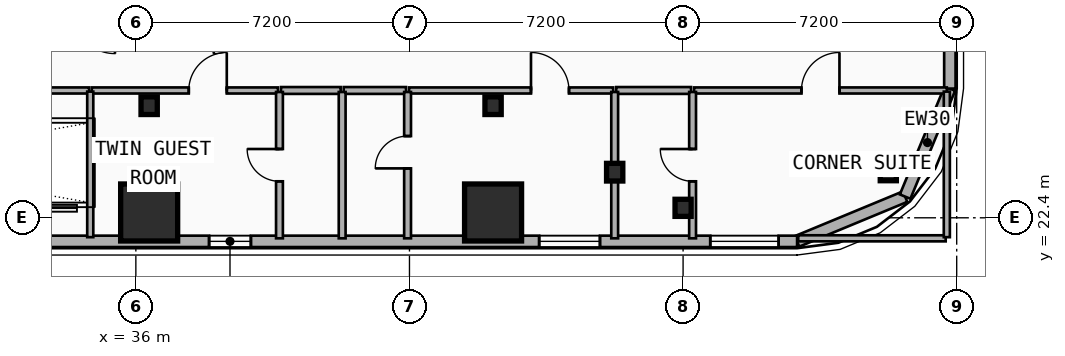
"""IFC4 building model, lengths in metres.
Left out: names, types, materials, properties, quantities, classifications, styles, units other than length and angle.
Written with IfcOpenShell. Run it as: python <this file> out.ifc"""

import sys

from ifc_helpers import new_model, si_unit, direction, frame, frame_2d, origin, origin_2d, place, context, subcontext, project, spatial, rectangle, i_section, extrude, element, fill, save


model = new_model("IFC4")
c1 = context("Model", 3, precision=1e-05, world=origin(), true_north=direction((0.0, 1.0)))
c2 = subcontext(c1, "Body", "Model", "MODEL_VIEW")
j1 = project(units=[si_unit("LENGTHUNIT", "METRE"), si_unit("PLANEANGLEUNIT", "RADIAN")], contexts=[c1])
p1 = place(None, origin())
s1 = spatial("IfcSite", under=j1, at=p1, CompositionType="ELEMENT")
p2 = place(p1, origin())
s2 = spatial("IfcBuilding", under=s1, at=p2, CompositionType="ELEMENT")
p3 = place(p2, frame((0.0, 0.0, 39.5)))
s3 = spatial("IfcBuildingStorey", under=s2, at=p3, CompositionType="ELEMENT", Elevation=39.5)
for number, where, z_axis, x_axis in (
    (1, (36.35, 25.35, 0.0), (0.0, 0.0, 1.0), (1.0, 0.0, 0.0)),
    (2, (45.4, 25.35, 0.0), (0.0, 0.0, 1.0), (1.0, 0.0, 0.0)),
):
    element("IfcColumn", number, at=place(p3, frame(where, z_axis=z_axis, x_axis=x_axis)), inside=s3, PredefinedType="COLUMN", context=c2, shape_type="SweptSolid", body=[
        extrude(i_section(OverallWidth=0.428, OverallDepth=0.465, WebThickness=0.045, FlangeThickness=0.073, FilletRadius=0.015, at=origin_2d()), origin(), (0.0, 0.0, 1.0), 3.5),
    ])
for number, where, z_axis, x_axis in (
    (3, (36.35, 22.648, 0.0), (0.0, -0.09, 0.996), (1.0, 0.0, 0.0)),
    (4, (45.4, 22.648, 0.0), (0.0, -0.09, 0.996), (1.0, 0.0, 0.0)),
):
    element("IfcColumn", number, at=place(p3, frame(where, z_axis=z_axis, x_axis=x_axis)), inside=s3, PredefinedType="COLUMN", context=c2, shape_type="SweptSolid", body=[
        extrude(rectangle(XDim=1.5, YDim=1.5, at=origin_2d()), origin(), (0.0, 0.0, 1.0), 3.514),
    ])
p4 = place(p3, frame((48.6, 23.6, 0.0), z_axis=(0.0, 0.0, 1.0), x_axis=(1.0, 0.0, 0.0)))
e5 = element("IfcColumn", 5, at=p4, inside=s3, PredefinedType="COLUMN", context=c2, shape_type="SweptSolid", body=[
    extrude(i_section(OverallWidth=0.428, OverallDepth=0.465, WebThickness=0.045, FlangeThickness=0.073, FilletRadius=0.015, at=origin_2d()), origin(), (0.0, 0.0, 1.0), 3.5),
])
p5 = place(p3, frame((50.4, 22.758, 0.0), z_axis=(0.0, -0.079891690793, 0.996803550226), x_axis=(1.0, 0.0, 0.0)))
e6 = element("IfcColumn", 6, at=p5, inside=s3, PredefinedType="COLUMN", context=c2, shape_type="SweptSolid", body=[
    extrude(i_section(OverallWidth=0.424, OverallDepth=0.45, WebThickness=0.041, FlangeThickness=0.065, FilletRadius=0.015, at=origin_2d()), origin(), (0.0, 0.0, 1.0), 3.511),
])
p6 = place(p3, frame((55.8, 23.6, 0.0), z_axis=(0.0, 0.0, 1.0), x_axis=(1.0, 0.0, 0.0)))
e7 = element("IfcColumn", 7, at=p6, inside=s3, PredefinedType="COLUMN", context=c2, shape_type="SweptSolid", body=[
    extrude(i_section(OverallWidth=0.424, OverallDepth=0.45, WebThickness=0.041, FlangeThickness=0.065, FilletRadius=0.015, at=origin_2d()), origin(), (0.0, 0.0, 1.0), 3.5),
])
p7 = place(p3, frame((56.243, 22.958, 0.0), z_axis=(0.0, 0.0, 1.0), x_axis=(-0.923882414032, -0.382676475685, 0.0)))
e8 = element("IfcWall", 8, at=p7, inside=s3, PredefinedType="SOLIDWALL", context=c2, shape_type="SweptSolid", body=[
    extrude(rectangle(XDim=3.077, YDim=0.3, at=frame_2d((1.539, 0.0))), origin(), (0.0, 0.0, 1.0), 3.24),
])
p8 = place(p3, frame((57.42, 25.8, 0.0), z_axis=(0.0, 0.0, 1.0), x_axis=(-0.382636798336, -0.92389884758, 0.0)))
e9 = element("IfcWall", 9, at=p8, inside=s3, PredefinedType="SOLIDWALL", context=c2, shape_type="SweptSolid", body=[
    extrude(rectangle(XDim=3.077, YDim=0.3, at=frame_2d((1.538, 0.0))), origin(), (0.0, 0.0, 1.0), 3.24),
])
p9 = place(p3, frame((57.42, 41.0, 0.0), z_axis=(0.0, 0.0, 1.0), x_axis=(0.0, -1.0, 0.0)))
e10 = element("IfcWall", 10, at=p9, inside=s3, PredefinedType="SOLIDWALL", context=c2, shape_type="SweptSolid", body=[
    extrude(rectangle(XDim=15.2, YDim=0.3, at=frame_2d((7.6, 0.0))), origin(), (0.0, 0.0, 1.0), 3.24),
])
p10 = place(p9, frame((10.882, 0.0, 0.48)))
e11 = element("IfcOpeningElement", 11, at=p10, cuts=e10, PredefinedType="OPENING", context=c2, shape_type="SweptSolid", body=[
    extrude(rectangle(XDim=1.4, YDim=1.8, at=frame_2d((0.7, 0.9))), frame((0.0, 0.16, 0.0), z_axis=(0.0, -1.0, 0.0), x_axis=(1.0, 0.0, 0.0)), (0.0, 0.0, 1.0), 0.32),
])
p11 = place(p9, frame((5.621, 0.0, 0.48)))
e12 = element("IfcOpeningElement", 12, at=p11, cuts=e10, PredefinedType="OPENING", context=c2, shape_type="SweptSolid", body=[
    extrude(rectangle(XDim=1.4, YDim=1.8, at=frame_2d((0.7, 0.9))), frame((0.0, 0.16, 0.0), z_axis=(0.0, -1.0, 0.0), x_axis=(1.0, 0.0, 0.0)), (0.0, 0.0, 1.0), 0.32),
])
p12 = place(p3, frame((53.4, 21.78, 0.0), z_axis=(0.0, 0.0, 1.0), x_axis=(-1.0, 0.0, 0.0)))
e13 = element("IfcWall", 13, at=p12, inside=s3, PredefinedType="SOLIDWALL", context=c2, shape_type="SweptSolid", body=[
    extrude(rectangle(XDim=49.2, YDim=0.3, at=frame_2d((24.6, 0.0))), origin(), (0.0, 0.0, 1.0), 3.24),
])
p13 = place(p12, frame((46.915, 0.0, 0.65)))
e14 = element("IfcOpeningElement", 14, at=p13, cuts=e13, PredefinedType="OPENING", context=c2, shape_type="SweptSolid", body=[
    extrude(rectangle(XDim=1.8, YDim=1.8, at=frame_2d((0.9, 0.9))), frame((0.0, 0.16, 0.0), z_axis=(0.0, -1.0, 0.0), x_axis=(1.0, 0.0, 0.0)), (0.0, 0.0, 1.0), 0.32),
])
p14 = place(p12, frame((42.413, 0.0, 0.48)))
e15 = element("IfcOpeningElement", 15, at=p14, cuts=e13, PredefinedType="OPENING", context=c2, shape_type="SweptSolid", body=[
    extrude(rectangle(XDim=1.6, YDim=1.95, at=frame_2d((0.8, 0.975))), frame((0.0, 0.16, 0.0), z_axis=(0.0, -1.0, 0.0), x_axis=(1.0, 0.0, 0.0)), (0.0, 0.0, 1.0), 0.32),
])
p15 = place(p12, frame((33.226, 0.0, 0.48)))
e16 = element("IfcOpeningElement", 16, at=p15, cuts=e13, PredefinedType="OPENING", context=c2, shape_type="SweptSolid", body=[
    extrude(rectangle(XDim=1.2, YDim=1.5, at=frame_2d((0.6, 0.75))), frame((0.0, 0.16, 0.0), z_axis=(0.0, -1.0, 0.0), x_axis=(1.0, 0.0, 0.0)), (0.0, 0.0, 1.0), 0.32),
])
p16 = place(p12, frame((14.373, 0.0, 1.48)))
e17 = element("IfcOpeningElement", 17, at=p16, cuts=e13, PredefinedType="OPENING", context=c2, shape_type="SweptSolid", body=[
    extrude(rectangle(XDim=1.1, YDim=1.05, at=frame_2d((0.55, 0.525))), frame((0.0, 0.16, 0.0), z_axis=(0.0, -1.0, 0.0), x_axis=(1.0, 0.0, 0.0)), (0.0, 0.0, 1.0), 0.32),
])
p17 = place(p12, frame((5.187, 0.0, 0.48)))
e18 = element("IfcOpeningElement", 18, at=p17, cuts=e13, PredefinedType="OPENING", context=c2, shape_type="SweptSolid", body=[
    extrude(rectangle(XDim=1.6, YDim=1.95, at=frame_2d((0.8, 0.975))), frame((0.0, 0.16, 0.0), z_axis=(0.0, -1.0, 0.0), x_axis=(1.0, 0.0, 0.0)), (0.0, 0.0, 1.0), 0.32),
])
p18 = place(p12, frame((0.485, 0.0, 0.65)))
e19 = element("IfcOpeningElement", 19, at=p18, cuts=e13, PredefinedType="OPENING", context=c2, shape_type="SweptSolid", body=[
    extrude(rectangle(XDim=1.8, YDim=1.8, at=frame_2d((0.9, 0.9))), frame((0.0, 0.16, 0.0), z_axis=(0.0, -1.0, 0.0), x_axis=(1.0, 0.0, 0.0)), (0.0, 0.0, 1.0), 0.32),
])
p19 = place(p3, frame((34.84, 25.75, 0.0), z_axis=(0.0, 0.0, 1.0), x_axis=(1.0, 0.0, 0.0)))
e20 = element("IfcWall", 20, at=p19, inside=s3, PredefinedType="PARTITIONING", context=c2, shape_type="SweptSolid", body=[
    extrude(rectangle(XDim=4.899, YDim=0.16, at=frame_2d((2.449, 0.0))), origin(), (0.0, 0.0, 1.0), 2.28),
])
p20 = place(p19, frame((2.553, 0.0, 0.0)))
e21 = element("IfcOpeningElement", 21, at=p20, cuts=e20, PredefinedType="OPENING", context=c2, shape_type="SweptSolid", body=[
    extrude(rectangle(XDim=1.0, YDim=2.15, at=frame_2d((0.5, 1.075))), frame((0.0, 0.09, 0.0), z_axis=(0.0, -1.0, 0.0), x_axis=(1.0, 0.0, 0.0)), (0.0, 0.0, 1.0), 0.18),
])
p21 = place(p3, frame((39.819, 25.75, 0.0), z_axis=(0.0, 0.0, 1.0), x_axis=(1.0, 0.0, 0.0)))
e22 = element("IfcWall", 22, at=p21, inside=s3, PredefinedType="PLUMBINGWALL", context=c2, shape_type="SweptSolid", body=[
    extrude(rectangle(XDim=1.57, YDim=0.18, at=frame_2d((0.785, 0.0))), origin(), (0.0, 0.0, 1.0), 3.24),
])
p22 = place(p3, frame((43.19, 25.75, 0.0), z_axis=(0.0, 0.0, 1.0), x_axis=(1.0, 0.0, 0.0)))
e23 = element("IfcWall", 23, at=p22, inside=s3, PredefinedType="PARTITIONING", context=c2, shape_type="SweptSolid", body=[
    extrude(rectangle(XDim=5.37, YDim=0.16, at=frame_2d((2.685, 0.0))), origin(), (0.0, 0.0, 1.0), 2.28),
])
p23 = place(p22, frame((3.208, 0.0, 0.0)))
e24 = element("IfcOpeningElement", 24, at=p23, cuts=e23, PredefinedType="OPENING", context=c2, shape_type="SweptSolid", body=[
    extrude(rectangle(XDim=1.0, YDim=2.15, at=frame_2d((0.5, 1.075))), frame((0.0, 0.09, 0.0), z_axis=(0.0, -1.0, 0.0), x_axis=(1.0, 0.0, 0.0)), (0.0, 0.0, 1.0), 0.18),
])
p24 = place(p3, frame((41.469, 25.75, 0.0), z_axis=(0.0, 0.0, 1.0), x_axis=(1.0, 0.0, 0.0)))
e25 = element("IfcWall", 25, at=p24, inside=s3, PredefinedType="PLUMBINGWALL", context=c2, shape_type="SweptSolid", body=[
    extrude(rectangle(XDim=1.641, YDim=0.18, at=frame_2d((0.821, 0.0))), origin(), (0.0, 0.0, 1.0), 3.24),
])
p25 = place(p3, frame((50.69, 25.75, 0.0), z_axis=(0.0, 0.0, 1.0), x_axis=(1.0, 0.0, 0.0)))
e26 = element("IfcWall", 26, at=p25, inside=s3, PredefinedType="PARTITIONING", context=c2, shape_type="SweptSolid", body=[
    extrude(rectangle(XDim=6.65, YDim=0.16, at=frame_2d((3.325, 0.0))), origin(), (0.0, 0.0, 1.0), 2.57),
])
p26 = place(p25, frame((2.825, 0.0, 0.0)))
e27 = element("IfcOpeningElement", 27, at=p26, cuts=e26, PredefinedType="OPENING", context=c2, shape_type="SweptSolid", body=[
    extrude(rectangle(XDim=1.0, YDim=2.15, at=frame_2d((0.5, 1.075))), frame((0.0, 0.09, 0.0), z_axis=(0.0, -1.0, 0.0), x_axis=(1.0, 0.0, 0.0)), (0.0, 0.0, 1.0), 0.18),
])
p27 = place(p3, frame((48.64, 25.75, 0.0), z_axis=(0.0, 0.0, 1.0), x_axis=(1.0, 0.0, 0.0)))
e28 = element("IfcWall", 28, at=p27, inside=s3, PredefinedType="PLUMBINGWALL", context=c2, shape_type="SweptSolid", body=[
    extrude(rectangle(XDim=1.97, YDim=0.18, at=frame_2d((0.985, 0.0))), origin(), (0.0, 0.0, 1.0), 2.57),
])
p28 = place(p3, frame((39.779, 21.86, 0.0), z_axis=(0.0, 0.0, 1.0), x_axis=(0.0, 1.0, 0.0)))
e29 = element("IfcWall", 29, at=p28, inside=s3, PredefinedType="PLUMBINGWALL", context=c2, shape_type="SweptSolid", body=[
    extrude(rectangle(XDim=3.85, YDim=0.18, at=frame_2d((1.925, 0.0))), origin(), (0.0, 0.0, 1.0), 2.82),
])
p29 = place(p28, frame((1.5, 0.0, 0.0)))
e30 = element("IfcOpeningElement", 30, at=p29, cuts=e29, PredefinedType="OPENING", context=c2, shape_type="SweptSolid", body=[
    extrude(rectangle(XDim=0.85, YDim=2.1, at=frame_2d((0.425, 1.05))), frame((0.0, 0.1, 0.0), z_axis=(0.0, -1.0, 0.0), x_axis=(1.0, 0.0, 0.0)), (0.0, 0.0, 1.0), 0.2),
])
p30 = place(p3, frame((41.429, 21.86, 0.0), z_axis=(0.0, 0.0, 1.0), x_axis=(0.0, 1.0, 0.0)))
e31 = element("IfcWall", 31, at=p30, inside=s3, PredefinedType="PLUMBINGWALL", context=c2, shape_type="SweptSolid", body=[
    extrude(rectangle(XDim=3.85, YDim=0.18, at=frame_2d((1.925, 0.0))), origin(), (0.0, 0.0, 1.0), 2.82),
])
p31 = place(p3, frame((43.15, 21.86, 0.0), z_axis=(0.0, 0.0, 1.0), x_axis=(0.0, 1.0, 0.0)))
e32 = element("IfcWall", 32, at=p31, inside=s3, PredefinedType="PLUMBINGWALL", context=c2, shape_type="SweptSolid", body=[
    extrude(rectangle(XDim=3.85, YDim=0.18, at=frame_2d((1.925, 0.0))), origin(), (0.0, 0.0, 1.0), 2.82),
])
p32 = place(p31, frame((1.84, 0.0, 0.0)))
e33 = element("IfcOpeningElement", 33, at=p32, cuts=e32, PredefinedType="OPENING", context=c2, shape_type="SweptSolid", body=[
    extrude(rectangle(XDim=0.85, YDim=2.1, at=frame_2d((0.425, 1.05))), frame((0.0, 0.1, 0.0), z_axis=(0.0, -1.0, 0.0), x_axis=(1.0, 0.0, 0.0)), (0.0, 0.0, 1.0), 0.2),
])
p33 = place(p3, frame((48.6, 21.86, 0.0), z_axis=(0.0, 0.0, 1.0), x_axis=(0.0, 1.0, 0.0)))
e34 = element("IfcWall", 34, at=p33, inside=s3, PredefinedType="PLUMBINGWALL", context=c2, shape_type="SweptSolid", body=[
    extrude(rectangle(XDim=3.85, YDim=0.18, at=frame_2d((1.925, 0.0))), origin(), (0.0, 0.0, 1.0), 2.72),
])
p34 = place(p3, frame((50.65, 21.86, 0.0), z_axis=(0.0, 0.0, 1.0), x_axis=(0.0, 1.0, 0.0)))
e35 = element("IfcWall", 35, at=p34, inside=s3, PredefinedType="PLUMBINGWALL", context=c2, shape_type="SweptSolid", body=[
    extrude(rectangle(XDim=3.85, YDim=0.18, at=frame_2d((1.925, 0.0))), origin(), (0.0, 0.0, 1.0), 2.57),
])
p35 = place(p34, frame((1.5, 0.0, 0.0)))
e36 = element("IfcOpeningElement", 36, at=p35, cuts=e35, PredefinedType="OPENING", context=c2, shape_type="SweptSolid", body=[
    extrude(rectangle(XDim=0.85, YDim=2.1, at=frame_2d((0.425, 1.05))), frame((0.0, 0.1, 0.0), z_axis=(0.0, -1.0, 0.0), x_axis=(1.0, 0.0, 0.0)), (0.0, 0.0, 1.0), 0.2),
])
p36 = place(p3, frame((22.83, 25.75, 0.0), z_axis=(0.0, 0.0, 1.0), x_axis=(1.0, 0.0, 0.0)))
e37 = element("IfcWall", 37, at=p36, inside=s3, PredefinedType="PARTITIONING", context=c2, shape_type="SweptSolid", body=[
    extrude(rectangle(XDim=11.94, YDim=0.16, at=frame_2d((5.97, 0.0))), origin(), (0.0, 0.0, 1.0), 3.24),
])
p37 = place(p3, frame((34.8, 21.89, 0.0), z_axis=(0.0, 0.0, 1.0), x_axis=(0.0, 1.0, 0.0)))
e38 = element("IfcWall", 38, at=p37, inside=s3, PredefinedType="PARTITIONING", context=c2, shape_type="SweptSolid", body=[
    extrude(rectangle(XDim=3.83, YDim=0.16, at=frame_2d((1.915, 0.0))), origin(), (0.0, 0.0, 1.0), 2.82),
])
p38 = place(p3, frame((53.43, 21.86, 0.0), z_axis=(0.0, 0.0, 1.0), x_axis=(1.0, 0.0, 0.0)))
e39 = element("IfcWall", 39, at=p38, inside=s3, PredefinedType="PARTITIONING", context=c2, shape_type="SweptSolid", body=[
    extrude(rectangle(XDim=3.88, YDim=0.16, at=frame_2d((1.94, 0.0))), origin(), (0.0, 0.0, 1.0), 3.24),
])
p39 = place(p3, frame((57.34, 21.89, 0.0), z_axis=(0.0, 0.0, 1.0), x_axis=(0.0, 1.0, 0.0)))
e40 = element("IfcWall", 40, at=p39, inside=s3, PredefinedType="PARTITIONING", context=c2, shape_type="SweptSolid", body=[
    extrude(rectangle(XDim=3.83, YDim=0.16, at=frame_2d((1.915, 0.0))), origin(), (0.0, 0.0, 1.0), 3.24),
])
p40 = place(p16, origin())
e41 = element("IfcWindow", 41, at=p40, inside=s3, PartitioningType="SINGLE_PANEL", PredefinedType="WINDOW", context=c2, shape_type="SweptSolid", body=[
    extrude(rectangle(XDim=1.1, YDim=1.05, at=frame_2d((0.55, 0.525))), frame((0.0, 0.03, 0.0), z_axis=(0.0, -1.0, 0.0), x_axis=(1.0, 0.0, 0.0)), (0.0, 0.0, 1.0), 0.06),
])
fill(e17, e41)
p41 = place(p17, origin())
e42 = element("IfcWindow", 42, at=p41, inside=s3, PartitioningType="SINGLE_PANEL", PredefinedType="WINDOW", context=c2, shape_type="SweptSolid", body=[
    extrude(rectangle(XDim=1.6, YDim=1.95, at=frame_2d((0.8, 0.975))), frame((0.0, 0.03, 0.0), z_axis=(0.0, -1.0, 0.0), x_axis=(1.0, 0.0, 0.0)), (0.0, 0.0, 1.0), 0.06),
])
fill(e18, e42)
p42 = place(p18, origin())
e43 = element("IfcWindow", 43, at=p42, inside=s3, PartitioningType="SINGLE_PANEL", PredefinedType="WINDOW", context=c2, shape_type="SweptSolid", body=[
    extrude(rectangle(XDim=1.8, YDim=1.8, at=frame_2d((0.9, 0.9))), frame((0.0, 0.03, 0.0), z_axis=(0.0, -1.0, 0.0), x_axis=(1.0, 0.0, 0.0)), (0.0, 0.0, 1.0), 0.06),
])
fill(e19, e43)
p43 = place(p20, origin())
e44 = element("IfcDoor", 44, at=p43, inside=s3, OperationType="SINGLE_SWING_RIGHT", PredefinedType="DOOR", context=c2, shape_type="SweptSolid", body=[
    extrude(rectangle(XDim=1.0, YDim=2.15, at=frame_2d((0.5, 1.075))), frame((0.0, 0.025, 0.0), z_axis=(0.0, -1.0, 0.0), x_axis=(1.0, 0.0, 0.0)), (0.0, 0.0, 1.0), 0.05),
])
fill(e21, e44)
p44 = place(p23, origin())
e45 = element("IfcDoor", 45, at=p44, inside=s3, OperationType="SINGLE_SWING_LEFT", PredefinedType="DOOR", context=c2, shape_type="SweptSolid", body=[
    extrude(rectangle(XDim=1.0, YDim=2.15, at=frame_2d((0.5, 1.075))), frame((0.0, 0.025, 0.0), z_axis=(0.0, -1.0, 0.0), x_axis=(1.0, 0.0, 0.0)), (0.0, 0.0, 1.0), 0.05),
])
fill(e24, e45)
p45 = place(p26, origin())
e46 = element("IfcDoor", 46, at=p45, inside=s3, OperationType="SINGLE_SWING_RIGHT", PredefinedType="DOOR", context=c2, shape_type="SweptSolid", body=[
    extrude(rectangle(XDim=1.0, YDim=2.15, at=frame_2d((0.5, 1.075))), frame((0.0, 0.025, 0.0), z_axis=(0.0, -1.0, 0.0), x_axis=(1.0, 0.0, 0.0)), (0.0, 0.0, 1.0), 0.05),
])
fill(e27, e46)
p46 = place(p29, origin())
e47 = element("IfcDoor", 47, at=p46, inside=s3, OperationType="SINGLE_SWING_RIGHT", PredefinedType="DOOR", context=c2, shape_type="SweptSolid", body=[
    extrude(rectangle(XDim=0.85, YDim=2.1, at=frame_2d((0.425, 1.05))), frame((0.0, 0.025, 0.0), z_axis=(0.0, -1.0, 0.0), x_axis=(1.0, 0.0, 0.0)), (0.0, 0.0, 1.0), 0.05),
])
fill(e30, e47)
p47 = place(p32, origin())
e48 = element("IfcDoor", 48, at=p47, inside=s3, OperationType="SINGLE_SWING_LEFT", PredefinedType="DOOR", context=c2, shape_type="SweptSolid", body=[
    extrude(rectangle(XDim=0.85, YDim=2.1, at=frame_2d((0.425, 1.05))), frame((0.0, 0.025, 0.0), z_axis=(0.0, -1.0, 0.0), x_axis=(1.0, 0.0, 0.0)), (0.0, 0.0, 1.0), 0.05),
])
fill(e33, e48)
p48 = place(p35, origin())
e49 = element("IfcDoor", 49, at=p48, inside=s3, OperationType="SINGLE_SWING_RIGHT", PredefinedType="DOOR", context=c2, shape_type="SweptSolid", body=[
    extrude(rectangle(XDim=0.85, YDim=2.1, at=frame_2d((0.425, 1.05))), frame((0.0, 0.025, 0.0), z_axis=(0.0, -1.0, 0.0), x_axis=(1.0, 0.0, 0.0)), (0.0, 0.0, 1.0), 0.05),
])
fill(e36, e49)
save(model, sys.argv[1])
